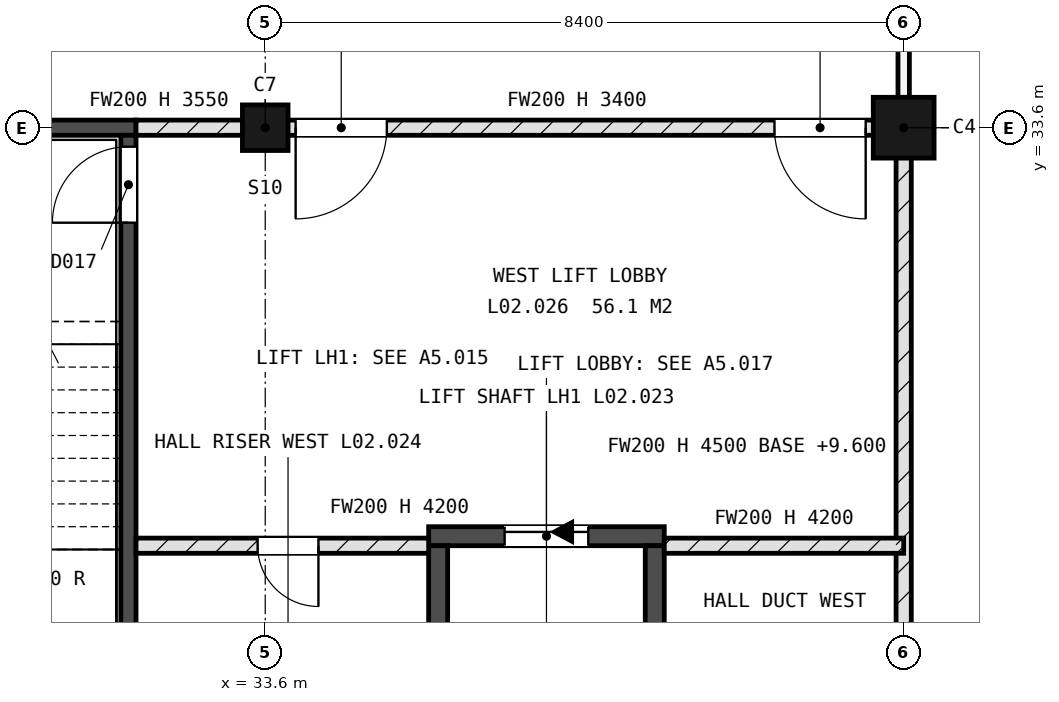
"""IFC4 building model, lengths in metres.
Left out: names, types, materials, properties, quantities, classifications, styles, units other than length and angle.
Written with IfcOpenShell. Run it as: python <this file> out.ifc"""

import sys

from ifc_helpers import new_model, si_unit, direction, frame, frame_2d, origin, origin_2d, place, context, subcontext, project, spatial, rectangle, extrude, element, fill, save


model = new_model("IFC4")
c1 = context("Model", 3, precision=1e-05, world=origin(), true_north=direction((0.0, 1.0)))
c2 = subcontext(c1, "Body", "Model", "MODEL_VIEW")
j1 = project(units=[si_unit("LENGTHUNIT", "METRE"), si_unit("PLANEANGLEUNIT", "RADIAN")], contexts=[c1])
p1 = place(None, origin())
s1 = spatial("IfcSite", under=j1, at=p1, CompositionType="ELEMENT")
p2 = place(p1, origin())
s2 = spatial("IfcBuilding", under=s1, at=p2, CompositionType="ELEMENT")
p3 = place(p2, frame((0.0, 0.0, 9.9)))
s3 = spatial("IfcBuildingStorey", under=s2, at=p3, CompositionType="ELEMENT", Elevation=9.9)
p4 = place(p3, frame((33.6, 33.6, -0.25), z_axis=(0.0, 0.0, 1.0), x_axis=(1.0, 0.0, 0.0)))
e1 = element("IfcColumn", 1, at=p4, inside=s3, PredefinedType="COLUMN", context=c2, shape_type="SweptSolid", body=[
    extrude(rectangle(XDim=0.6, YDim=0.6, at=origin_2d()), origin(), (0.0, 0.0, 1.0), 4.45),
])
p5 = place(p3, frame((42.0, 33.6, -0.25), z_axis=(0.0, 0.0, 1.0), x_axis=(1.0, 0.0, 0.0)))
e2 = element("IfcColumn", 2, at=p5, inside=s3, PredefinedType="COLUMN", context=c2, shape_type="SweptSolid", body=[
    extrude(rectangle(XDim=0.8, YDim=0.8, at=origin_2d()), origin(), (0.0, 0.0, 1.0), 4.45),
])
p6 = place(p3, frame((35.75, 28.225, -0.25), z_axis=(0.0, 0.0, 1.0), x_axis=(1.0, 0.0, 0.0)))
e3 = element("IfcWall", 3, at=p6, inside=s3, PredefinedType="SHEAR", context=c2, shape_type="SweptSolid", body=[
    extrude(rectangle(XDim=3.1, YDim=0.25, at=frame_2d((1.55, 0.0))), origin(), (0.0, 0.0, 1.0), 4.45),
])
p7 = place(p6, frame((1.0, 0.0, 0.25)))
e4 = element("IfcOpeningElement", 4, at=p7, cuts=e3, PredefinedType="OPENING", context=c2, shape_type="SweptSolid", body=[
    extrude(rectangle(XDim=1.1, YDim=2.1, at=frame_2d((0.55, 1.05))), frame((0.0, 0.135, 0.0), z_axis=(0.0, -1.0, 0.0), x_axis=(1.0, 0.0, 0.0)), (0.0, 0.0, 1.0), 0.27),
])
for number, where, z_axis, x_axis in (
    (5, (35.875, 25.2, -0.25), (0.0, 0.0, 1.0), (0.0, 1.0, 0.0)),
    (6, (38.725, 25.2, -0.25), (0.0, 0.0, 1.0), (0.0, 1.0, 0.0)),
):
    element("IfcWall", number, at=place(p3, frame(where, z_axis=z_axis, x_axis=x_axis)), inside=s3, PredefinedType="SHEAR", context=c2, shape_type="SweptSolid", body=[
        extrude(rectangle(XDim=2.9, YDim=0.25, at=frame_2d((1.45, 0.0))), origin(), (0.0, 0.0, 1.0), 4.45),
    ])
p8 = place(p3, frame((27.5, 33.6, -0.3), z_axis=(0.0, 0.0, 1.0), x_axis=(1.0, 0.0, 0.0)))
e7 = element("IfcWall", 7, at=p8, inside=s3, PredefinedType="SHEAR", context=c2, shape_type="SweptSolid", body=[
    extrude(rectangle(XDim=4.4, YDim=0.2, at=frame_2d((2.2, 0.0))), origin(), (0.0, 0.0, 1.0), 4.5),
])
p9 = place(p3, frame((31.8, 25.3, -0.3), z_axis=(0.0, 0.0, 1.0), x_axis=(0.0, 1.0, 0.0)))
e8 = element("IfcWall", 8, at=p9, inside=s3, PredefinedType="SHEAR", context=c2, shape_type="SweptSolid", body=[
    extrude(rectangle(XDim=8.2, YDim=0.2, at=frame_2d((4.1, 0.0))), origin(), (0.0, 0.0, 1.0), 4.5),
])
p10 = place(p9, frame((7.05, 0.0, 0.3)))
e9 = element("IfcOpeningElement", 9, at=p10, cuts=e8, PredefinedType="OPENING", context=c2, shape_type="SweptSolid", body=[
    extrude(rectangle(XDim=1.0, YDim=2.1, at=frame_2d((0.5, 1.05))), frame((0.0, 0.11, 0.0), z_axis=(0.0, -1.0, 0.0), x_axis=(1.0, 0.0, 0.0)), (0.0, 0.0, 1.0), 0.22),
])
p11 = place(p3, frame((42.0, 25.3, -0.3), z_axis=(0.0, 0.0, 1.0), x_axis=(0.0, 1.0, 0.0)))
e10 = element("IfcWall", 10, at=p11, inside=s3, PredefinedType="SOLIDWALL", context=c2, shape_type="SweptSolid", body=[
    extrude(rectangle(XDim=8.2, YDim=0.2, at=frame_2d((4.1, 0.0))), origin(), (0.0, 0.0, 1.0), 4.5),
])
p12 = place(p3, frame((42.0, 33.7, -0.3), z_axis=(0.0, 0.0, 1.0), x_axis=(0.0, 1.0, 0.0)))
e11 = element("IfcWall", 11, at=p12, inside=s3, PredefinedType="PARTITIONING", context=c2, shape_type="SweptSolid", body=[
    extrude(rectangle(XDim=4.025, YDim=0.15, at=frame_2d((2.013, 0.0))), origin(), (0.0, 0.0, 1.0), 4.5),
])
p13 = place(p3, frame((31.9, 28.1, 0.0), z_axis=(0.0, 0.0, 1.0), x_axis=(1.0, 0.0, 0.0)))
e12 = element("IfcWall", 12, at=p13, inside=s3, PredefinedType="SOLIDWALL", context=c2, shape_type="SweptSolid", body=[
    extrude(rectangle(XDim=3.85, YDim=0.2, at=frame_2d((1.925, 0.0))), origin(), (0.0, 0.0, 1.0), 4.2),
])
p14 = place(p13, frame((1.6, 0.0, 0.0)))
e13 = element("IfcOpeningElement", 13, at=p14, cuts=e12, PredefinedType="OPENING", context=c2, shape_type="SweptSolid", body=[
    extrude(rectangle(XDim=0.8, YDim=2.1, at=frame_2d((0.4, 1.05))), frame((0.0, 0.11, 0.0), z_axis=(0.0, -1.0, 0.0), x_axis=(1.0, 0.0, 0.0)), (0.0, 0.0, 1.0), 0.22),
])
p15 = place(p3, frame((38.85, 28.1, 0.0), z_axis=(0.0, 0.0, 1.0), x_axis=(1.0, 0.0, 0.0)))
e14 = element("IfcWall", 14, at=p15, inside=s3, PredefinedType="SOLIDWALL", context=c2, shape_type="SweptSolid", body=[
    extrude(rectangle(XDim=3.15, YDim=0.2, at=frame_2d((1.575, 0.0))), origin(), (0.0, 0.0, 1.0), 4.2),
])
p16 = place(p3, frame((31.9, 33.6, 0.0), z_axis=(0.0, 0.0, 1.0), x_axis=(1.0, 0.0, 0.0)))
e15 = element("IfcWall", 15, at=p16, inside=s3, PredefinedType="SOLIDWALL", context=c2, shape_type="SweptSolid", body=[
    extrude(rectangle(XDim=1.5, YDim=0.2, at=frame_2d((0.75, 0.0))), origin(), (0.0, 0.0, 1.0), 3.55),
])
p17 = place(p3, frame((33.4, 33.6, 0.0), z_axis=(0.0, 0.0, 1.0), x_axis=(1.0, 0.0, 0.0)))
e16 = element("IfcWall", 16, at=p17, inside=s3, PredefinedType="SOLIDWALL", context=c2, shape_type="SweptSolid", body=[
    extrude(rectangle(XDim=8.6, YDim=0.2, at=frame_2d((4.3, 0.0))), origin(), (0.0, 0.0, 1.0), 3.4),
])
p18 = place(p17, frame((0.6, 0.0, 0.0)))
e17 = element("IfcOpeningElement", 17, at=p18, cuts=e16, PredefinedType="OPENING", context=c2, shape_type="SweptSolid", body=[
    extrude(rectangle(XDim=1.2, YDim=2.1, at=frame_2d((0.6, 1.05))), frame((0.0, 0.11, 0.0), z_axis=(0.0, -1.0, 0.0), x_axis=(1.0, 0.0, 0.0)), (0.0, 0.0, 1.0), 0.22),
])
p19 = place(p17, frame((6.9, 0.0, 0.0)))
e18 = element("IfcOpeningElement", 18, at=p19, cuts=e16, PredefinedType="OPENING", context=c2, shape_type="SweptSolid", body=[
    extrude(rectangle(XDim=1.2, YDim=2.1, at=frame_2d((0.6, 1.05))), frame((0.0, 0.11, 0.0), z_axis=(0.0, -1.0, 0.0), x_axis=(1.0, 0.0, 0.0)), (0.0, 0.0, 1.0), 0.22),
])
p20 = place(p7, origin())
e19 = element("IfcDoor", 19, at=p20, inside=s3, OperationType="SLIDING_TO_LEFT", PredefinedType="DOOR", context=c2, shape_type="SweptSolid", body=[
    extrude(rectangle(XDim=1.1, YDim=2.1, at=frame_2d((0.55, 1.05))), frame((0.0, 0.025, 0.0), z_axis=(0.0, -1.0, 0.0), x_axis=(1.0, 0.0, 0.0)), (0.0, 0.0, 1.0), 0.05),
])
fill(e4, e19)
p21 = place(p10, origin())
e20 = element("IfcDoor", 20, at=p21, inside=s3, OperationType="SINGLE_SWING_RIGHT", PredefinedType="DOOR", context=c2, shape_type="SweptSolid", body=[
    extrude(rectangle(XDim=1.0, YDim=2.1, at=frame_2d((0.5, 1.05))), frame((0.0, 0.025, 0.0), z_axis=(0.0, -1.0, 0.0), x_axis=(1.0, 0.0, 0.0)), (0.0, 0.0, 1.0), 0.05),
])
fill(e9, e20)
p22 = place(p14, origin())
e21 = element("IfcDoor", 21, at=p22, inside=s3, OperationType="SINGLE_SWING_RIGHT", PredefinedType="DOOR", context=c2, shape_type="SweptSolid", body=[
    extrude(rectangle(XDim=0.8, YDim=2.1, at=frame_2d((0.4, 1.05))), frame((0.0, 0.025, 0.0), z_axis=(0.0, -1.0, 0.0), x_axis=(1.0, 0.0, 0.0)), (0.0, 0.0, 1.0), 0.05),
])
fill(e13, e21)
p23 = place(p18, origin())
e22 = element("IfcDoor", 22, at=p23, inside=s3, OperationType="SINGLE_SWING_LEFT", PredefinedType="DOOR", context=c2, shape_type="SweptSolid", body=[
    extrude(rectangle(XDim=1.2, YDim=2.1, at=frame_2d((0.6, 1.05))), frame((0.0, 0.025, 0.0), z_axis=(0.0, -1.0, 0.0), x_axis=(1.0, 0.0, 0.0)), (0.0, 0.0, 1.0), 0.05),
])
fill(e17, e22)
p24 = place(p19, origin())
e23 = element("IfcDoor", 23, at=p24, inside=s3, OperationType="SINGLE_SWING_RIGHT", PredefinedType="DOOR", context=c2, shape_type="SweptSolid", body=[
    extrude(rectangle(XDim=1.2, YDim=2.1, at=frame_2d((0.6, 1.05))), frame((0.0, 0.025, 0.0), z_axis=(0.0, -1.0, 0.0), x_axis=(1.0, 0.0, 0.0)), (0.0, 0.0, 1.0), 0.05),
])
fill(e18, e23)
save(model, sys.argv[1])
